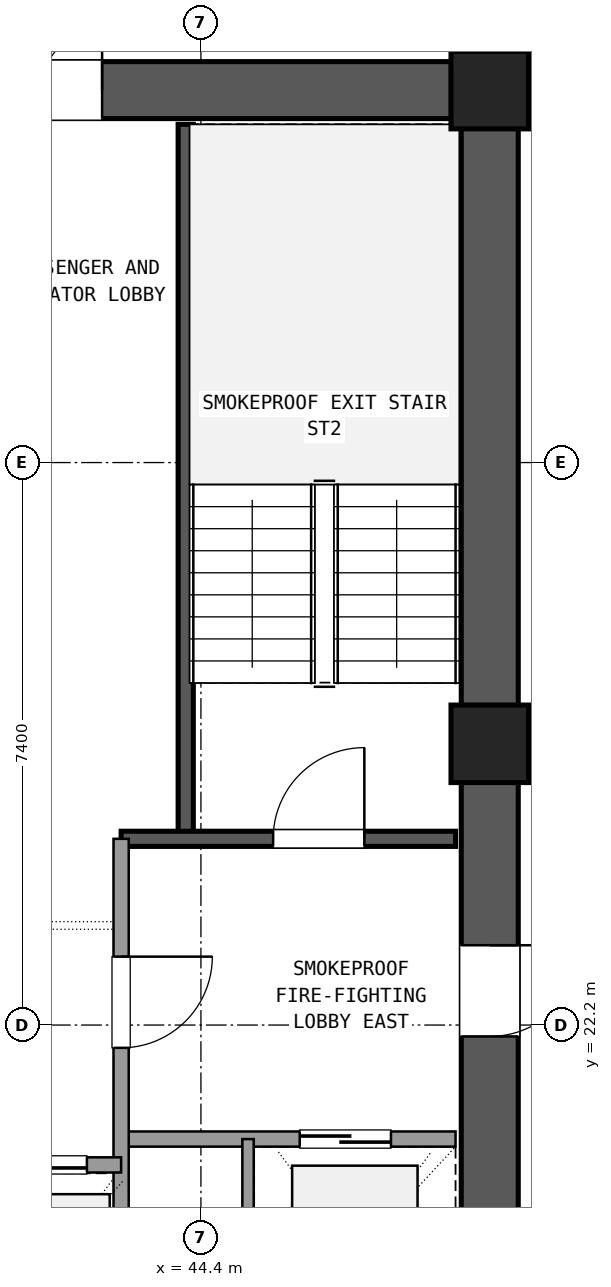
"""IFC4 building model, lengths in metres.
Left out: names, types, materials, properties, quantities, classifications, styles, units other than length and angle.
Written with IfcOpenShell. Run it as: python <this file> out.ifc"""

import sys

from ifc_helpers import new_model, si_unit, direction, frame, frame_2d, origin, origin_2d, place, context, subcontext, project, spatial, rectangle, extrude, element, fill, save


model = new_model("IFC4")
c1 = context("Model", 3, precision=1e-05, world=origin(), true_north=direction((0.0, 1.0)))
c2 = subcontext(c1, "Body", "Model", "MODEL_VIEW")
j1 = project(units=[si_unit("LENGTHUNIT", "METRE"), si_unit("PLANEANGLEUNIT", "RADIAN")], contexts=[c1])
p1 = place(None, origin())
s1 = spatial("IfcSite", under=j1, at=p1, CompositionType="ELEMENT")
p2 = place(p1, origin())
s2 = spatial("IfcBuilding", under=s1, at=p2, CompositionType="ELEMENT")
p3 = place(p2, frame((0.0, 0.0, 134.82)))
s3 = spatial("IfcBuildingStorey", under=s2, at=p3, CompositionType="ELEMENT", Elevation=134.82)
for number, where, z_axis, x_axis in (
    (1, (48.2, 25.9, 0.0), (0.0, 0.0, 1.0), (1.0, 0.0, 0.0)),
    (2, (48.2, 34.5, 0.0), (0.0, 0.0, 1.0), (1.0, 0.0, 0.0)),
):
    element("IfcColumn", number, at=place(p3, frame(where, z_axis=z_axis, x_axis=x_axis)), inside=s3, PredefinedType="COLUMN", context=c2, shape_type="SweptSolid", body=[
        extrude(rectangle(XDim=1.02, YDim=1.02, at=origin_2d()), origin(), (0.0, 0.0, 1.0), 3.6),
    ])
p4 = place(p3, frame((48.2, 17.805, 0.0), z_axis=(0.0, 0.0, 1.0), x_axis=(0.0, 1.0, 0.0)))
e3 = element("IfcWall", 3, at=p4, inside=s3, PredefinedType="SHEAR", context=c2, shape_type="SweptSolid", body=[
    extrude(rectangle(XDim=7.59, YDim=0.75, at=frame_2d((3.795, 0.0))), origin(), (0.0, 0.0, 1.0), 3.32),
])
p5 = place(p4, frame((4.245, 0.0, 0.0)))
e4 = element("IfcOpeningElement", 4, at=p5, cuts=e3, PredefinedType="OPENING", context=c2, shape_type="SweptSolid", body=[
    extrude(rectangle(XDim=1.2, YDim=2.15, at=frame_2d((0.6, 1.075))), frame((0.0, 0.385, 0.0), z_axis=(0.0, -1.0, 0.0), x_axis=(1.0, 0.0, 0.0)), (0.0, 0.0, 1.0), 0.77),
])
p6 = place(p3, frame((48.2, 26.405, 0.0), z_axis=(0.0, 0.0, 1.0), x_axis=(0.0, 1.0, 0.0)))
e5 = element("IfcWall", 5, at=p6, inside=s3, PredefinedType="SHEAR", context=c2, shape_type="SweptSolid", body=[
    extrude(rectangle(XDim=7.59, YDim=0.75, at=frame_2d((3.795, 0.0))), origin(), (0.0, 0.0, 1.0), 3.32),
])
p7 = place(p3, frame((47.695, 34.5, 0.0), z_axis=(0.0, 0.0, 1.0), x_axis=(-1.0, 0.0, 0.0)))
e6 = element("IfcWall", 6, at=p7, inside=s3, PredefinedType="SHEAR", context=c2, shape_type="SweptSolid", body=[
    extrude(rectangle(XDim=10.19, YDim=0.75, at=frame_2d((5.095, 0.0))), origin(), (0.0, 0.0, 1.0), 3.32),
])
p8 = place(p7, frame((4.595, 0.0, 0.0)))
e7 = element("IfcOpeningElement", 7, at=p8, cuts=e6, PredefinedType="OPENING", context=c2, shape_type="SweptSolid", body=[
    extrude(rectangle(XDim=1.6, YDim=2.2, at=frame_2d((0.8, 1.1))), frame((0.0, 0.385, 0.0), z_axis=(0.0, -1.0, 0.0), x_axis=(1.0, 0.0, 0.0)), (0.0, 0.0, 1.0), 0.77),
])
p9 = place(p3, frame((44.2, 24.65, 0.0), z_axis=(0.0, 0.0, 1.0), x_axis=(0.0, 1.0, 0.0)))
e8 = element("IfcWall", 8, at=p9, inside=s3, PredefinedType="SHEAR", context=c2, shape_type="SweptSolid", body=[
    extrude(rectangle(XDim=9.4, YDim=0.2, at=frame_2d((4.7, 0.0))), origin(), (0.0, 0.0, 1.0), 3.32),
])
p10 = place(p3, frame((43.35, 24.65, 0.0), z_axis=(0.0, 0.0, 1.0), x_axis=(1.0, 0.0, 0.0)))
e9 = element("IfcWall", 9, at=p10, inside=s3, PredefinedType="SHEAR", context=c2, shape_type="SweptSolid", body=[
    extrude(rectangle(XDim=4.4, YDim=0.2, at=frame_2d((2.2, 0.0))), origin(), (0.0, 0.0, 1.0), 3.32),
])
p11 = place(p10, frame((2.0, 0.0, 0.0)))
e10 = element("IfcOpeningElement", 10, at=p11, cuts=e9, PredefinedType="OPENING", context=c2, shape_type="SweptSolid", body=[
    extrude(rectangle(XDim=1.2, YDim=2.15, at=frame_2d((0.6, 1.075))), frame((0.0, 0.11, 0.0), z_axis=(0.0, -1.0, 0.0), x_axis=(1.0, 0.0, 0.0)), (0.0, 0.0, 1.0), 0.22),
])
p12 = place(p3, frame((43.35, 20.7, 0.0), z_axis=(0.0, 0.0, 1.0), x_axis=(1.0, 0.0, 0.0)))
e11 = element("IfcWall", 11, at=p12, inside=s3, PredefinedType="SOLIDWALL", context=c2, shape_type="SweptSolid", body=[
    extrude(rectangle(XDim=4.4, YDim=0.2, at=frame_2d((2.2, 0.0))), origin(), (0.0, 0.0, 1.0), 2.61),
])
p13 = place(p12, frame((2.35, 0.0, 0.0)))
e12 = element("IfcOpeningElement", 12, at=p13, cuts=e11, PredefinedType="OPENING", context=c2, shape_type="SweptSolid", body=[
    extrude(rectangle(XDim=1.2, YDim=2.15, at=frame_2d((0.6, 1.075))), frame((0.0, 0.11, 0.0), z_axis=(0.0, -1.0, 0.0), x_axis=(1.0, 0.0, 0.0)), (0.0, 0.0, 1.0), 0.22),
])
p14 = place(p3, frame((43.35, 17.75, 0.0), z_axis=(0.0, 0.0, 1.0), x_axis=(0.0, 1.0, 0.0)))
e13 = element("IfcWall", 13, at=p14, inside=s3, PredefinedType="SOLIDWALL", context=c2, shape_type="SweptSolid", body=[
    extrude(rectangle(XDim=6.9, YDim=0.2, at=frame_2d((3.45, 0.0))), origin(), (0.0, 0.0, 1.0), 2.61),
])
p15 = place(p14, frame((4.15, 0.0, 0.0)))
e14 = element("IfcOpeningElement", 14, at=p15, cuts=e13, PredefinedType="OPENING", context=c2, shape_type="SweptSolid", body=[
    extrude(rectangle(XDim=1.2, YDim=2.15, at=frame_2d((0.6, 1.075))), frame((0.0, 0.11, 0.0), z_axis=(0.0, -1.0, 0.0), x_axis=(1.0, 0.0, 0.0)), (0.0, 0.0, 1.0), 0.22),
])
p16 = place(p3, frame((45.02, 17.75, 0.0), z_axis=(0.0, 0.0, 1.0), x_axis=(0.0, 1.0, 0.0)))
e15 = element("IfcWall", 15, at=p16, inside=s3, PredefinedType="PARTITIONING", context=c2, shape_type="SweptSolid", body=[
    extrude(rectangle(XDim=2.95, YDim=0.15, at=frame_2d((1.475, 0.0))), origin(), (0.0, 0.0, 1.0), 2.61),
])
p17 = place(p3, frame((37.25, 20.36, 0.0), z_axis=(0.0, 0.0, 1.0), x_axis=(1.0, 0.0, 0.0)))
e16 = element("IfcWall", 16, at=p17, inside=s3, PredefinedType="SOLIDWALL", context=c2, shape_type="SweptSolid", body=[
    extrude(rectangle(XDim=6.1, YDim=0.2, at=frame_2d((3.05, 0.0))), origin(), (0.0, 0.0, 1.0), 2.61),
])
p18 = place(p17, frame((0.45, 0.0, 0.0)))
e17 = element("IfcOpeningElement", 17, at=p18, cuts=e16, PredefinedType="OPENING", context=c2, shape_type="SweptSolid", body=[
    extrude(rectangle(XDim=1.1, YDim=2.15, at=frame_2d((0.55, 1.075))), frame((0.0, 0.11, 0.0), z_axis=(0.0, -1.0, 0.0), x_axis=(1.0, 0.0, 0.0)), (0.0, 0.0, 1.0), 0.22),
])
p19 = place(p17, frame((2.5, 0.0, 0.0)))
e18 = element("IfcOpeningElement", 18, at=p19, cuts=e16, PredefinedType="OPENING", context=c2, shape_type="SweptSolid", body=[
    extrude(rectangle(XDim=1.1, YDim=2.15, at=frame_2d((0.55, 1.075))), frame((0.0, 0.11, 0.0), z_axis=(0.0, -1.0, 0.0), x_axis=(1.0, 0.0, 0.0)), (0.0, 0.0, 1.0), 0.22),
])
p20 = place(p17, frame((4.55, 0.0, 0.0)))
e19 = element("IfcOpeningElement", 19, at=p20, cuts=e16, PredefinedType="OPENING", context=c2, shape_type="SweptSolid", body=[
    extrude(rectangle(XDim=1.1, YDim=2.15, at=frame_2d((0.55, 1.075))), frame((0.0, 0.11, 0.0), z_axis=(0.0, -1.0, 0.0), x_axis=(1.0, 0.0, 0.0)), (0.0, 0.0, 1.0), 0.22),
])
p21 = place(p11, origin())
e20 = element("IfcDoor", 20, at=p21, inside=s3, OperationType="SINGLE_SWING_RIGHT", PredefinedType="DOOR", context=c2, shape_type="SweptSolid", body=[
    extrude(rectangle(XDim=1.2, YDim=2.15, at=frame_2d((0.6, 1.075))), frame((0.0, 0.025, 0.0), z_axis=(0.0, -1.0, 0.0), x_axis=(1.0, 0.0, 0.0)), (0.0, 0.0, 1.0), 0.05),
])
fill(e10, e20)
p22 = place(p13, origin())
e21 = element("IfcDoor", 21, at=p22, inside=s3, OperationType="SLIDING_TO_RIGHT", PredefinedType="DOOR", context=c2, shape_type="SweptSolid", body=[
    extrude(rectangle(XDim=1.2, YDim=2.15, at=frame_2d((0.6, 1.075))), frame((0.0, 0.025, 0.0), z_axis=(0.0, -1.0, 0.0), x_axis=(1.0, 0.0, 0.0)), (0.0, 0.0, 1.0), 0.05),
])
fill(e12, e21)
p23 = place(p15, frame((1.2, 0.0, 0.0), z_axis=(0.0, 0.0, 1.0), x_axis=(-1.0, 0.0, 0.0)))
e22 = element("IfcDoor", 22, at=p23, inside=s3, OperationType="SINGLE_SWING_RIGHT", PredefinedType="DOOR", context=c2, shape_type="SweptSolid", body=[
    extrude(rectangle(XDim=1.2, YDim=2.15, at=frame_2d((0.6, 1.075))), frame((0.0, 0.025, 0.0), z_axis=(0.0, -1.0, 0.0), x_axis=(1.0, 0.0, 0.0)), (0.0, 0.0, 1.0), 0.05),
])
fill(e14, e22)
p24 = place(p5, frame((1.2, 0.0, 0.0), z_axis=(0.0, 0.0, 1.0), x_axis=(-1.0, 0.0, 0.0)))
e23 = element("IfcDoor", 23, at=p24, inside=s3, OperationType="SINGLE_SWING_RIGHT", PredefinedType="DOOR", context=c2, shape_type="SweptSolid", body=[
    extrude(rectangle(XDim=1.2, YDim=2.15, at=frame_2d((0.6, 1.075))), frame((0.0, 0.025, 0.0), z_axis=(0.0, -1.0, 0.0), x_axis=(1.0, 0.0, 0.0)), (0.0, 0.0, 1.0), 0.05),
])
fill(e4, e23)
p25 = place(p8, frame((1.6, 0.0, 0.0), z_axis=(0.0, 0.0, 1.0), x_axis=(-1.0, 0.0, 0.0)))
e24 = element("IfcDoor", 24, at=p25, inside=s3, OperationType="DOUBLE_DOOR_SINGLE_SWING", PredefinedType="DOOR", context=c2, shape_type="SweptSolid", body=[
    extrude(rectangle(XDim=1.6, YDim=2.2, at=frame_2d((0.8, 1.1))), frame((0.0, 0.025, 0.0), z_axis=(0.0, -1.0, 0.0), x_axis=(1.0, 0.0, 0.0)), (0.0, 0.0, 1.0), 0.05),
])
fill(e7, e24)
p26 = place(p20, origin())
e25 = element("IfcDoor", 25, at=p26, inside=s3, OperationType="SLIDING_TO_LEFT", PredefinedType="DOOR", context=c2, shape_type="SweptSolid", body=[
    extrude(rectangle(XDim=1.1, YDim=2.15, at=frame_2d((0.55, 1.075))), frame((0.0, 0.025, 0.0), z_axis=(0.0, -1.0, 0.0), x_axis=(1.0, 0.0, 0.0)), (0.0, 0.0, 1.0), 0.05),
])
fill(e19, e25)
save(model, sys.argv[1])
